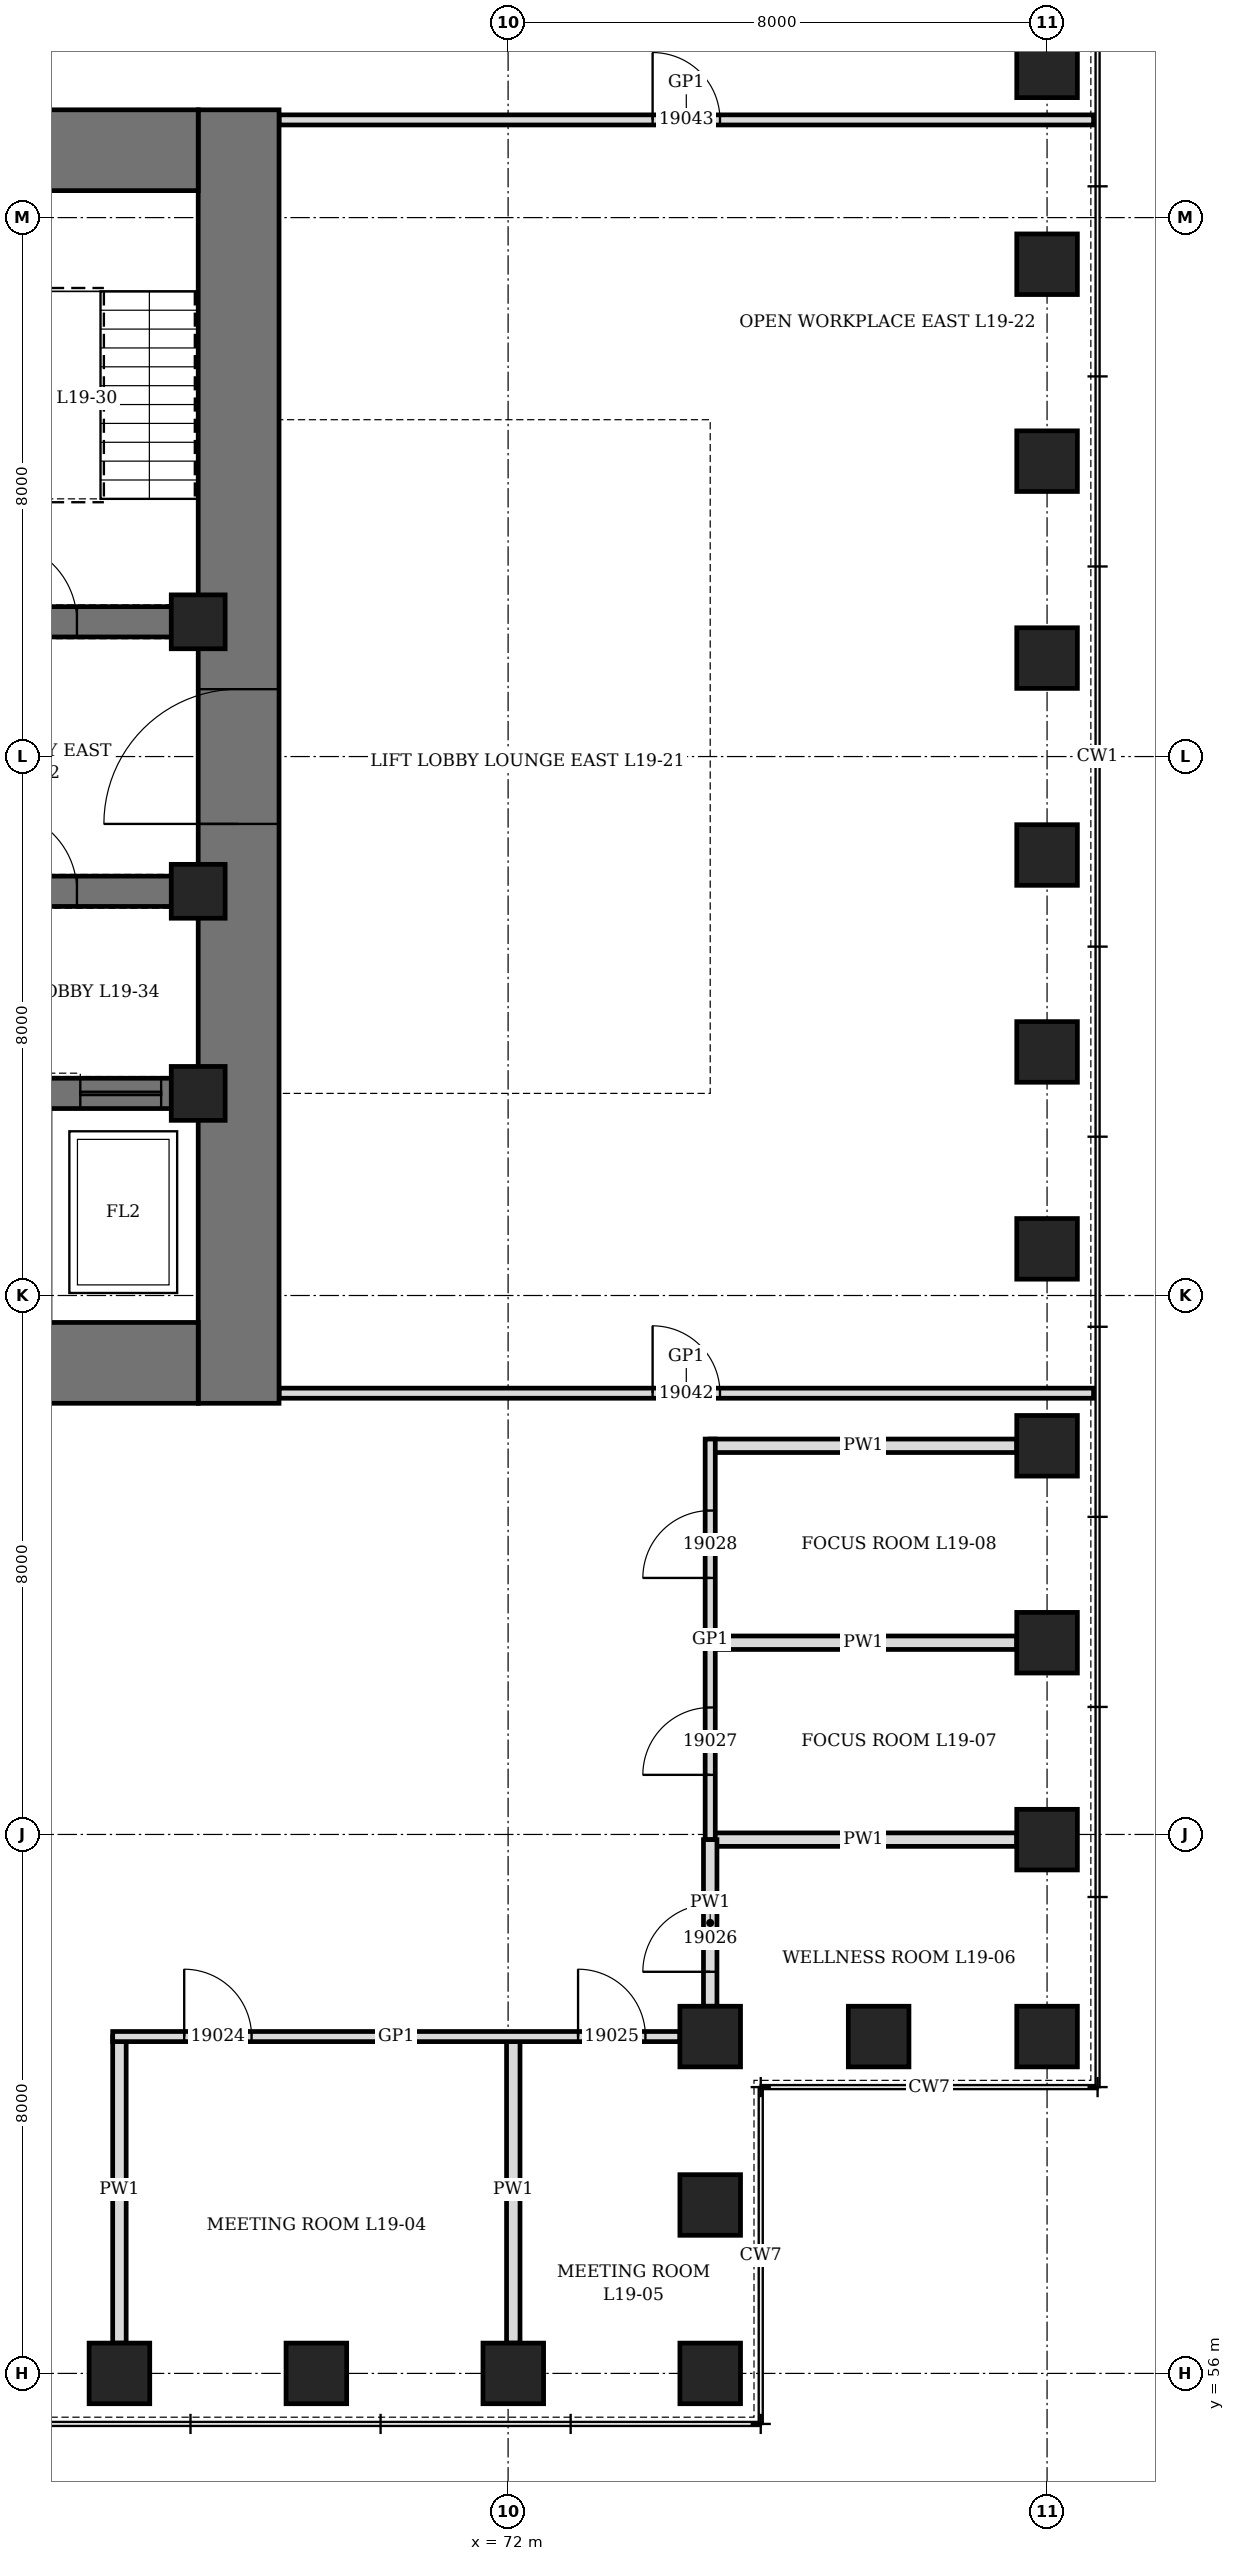
"""IFC4 building model, lengths in metres.
Left out: names, types, materials, properties, quantities, classifications, styles, units other than length and angle.
Written with IfcOpenShell. Run it as: python <this file> out.ifc"""

import sys

from ifc_helpers import new_model, si_unit, direction, frame, frame_2d, origin, origin_2d, place, context, subcontext, project, spatial, rectangle, hollow_rectangle, extrude, element, fill, save


model = new_model("IFC4")
c1 = context("Model", 3, precision=1e-05, world=origin(), true_north=direction((0.0, 1.0)))
c2 = subcontext(c1, "Body", "Model", "MODEL_VIEW")
j1 = project(units=[si_unit("LENGTHUNIT", "METRE"), si_unit("PLANEANGLEUNIT", "RADIAN")], contexts=[c1])
p1 = place(None, origin())
s1 = spatial("IfcSite", under=j1, at=p1, CompositionType="ELEMENT")
p2 = place(p1, origin())
s2 = spatial("IfcBuilding", under=s1, at=p2, CompositionType="ELEMENT")
p3 = place(p2, frame((0.0, 0.0, 89.5)))
s3 = spatial("IfcBuildingStorey", under=s2, at=p3, CompositionType="ELEMENT", Elevation=89.5)
for number, where, z_axis, x_axis in (
    (1, (66.231, 56.0, 0.0), (0.0, 0.0, 1.0), (1.0, 0.0, 0.0)),
    (2, (69.154, 56.0, 0.0), (0.0, 0.0, 1.0), (1.0, 0.0, 0.0)),
    (3, (72.077, 56.0, 0.0), (0.0, 0.0, 1.0), (1.0, 0.0, 0.0)),
    (4, (75.0, 56.0, 0.0), (0.0, 0.0, 1.0), (0.0, 1.0, 0.0)),
    (5, (75.0, 58.5, 0.0), (0.0, 0.0, 1.0), (0.0, 1.0, 0.0)),
    (6, (75.0, 61.0, 0.0), (0.0, 0.0, 1.0), (1.0, 0.0, 0.0)),
    (7, (77.5, 61.0, 0.0), (0.0, 0.0, 1.0), (1.0, 0.0, 0.0)),
    (8, (80.0, 61.0, 0.0), (0.0, 0.0, 1.0), (0.0, 1.0, 0.0)),
    (9, (80.0, 63.923, 0.0), (0.0, 0.0, 1.0), (0.0, 1.0, 0.0)),
    (10, (80.0, 66.846, 0.0), (0.0, 0.0, 1.0), (0.0, 1.0, 0.0)),
    (11, (80.0, 69.769, 0.0), (0.0, 0.0, 1.0), (0.0, 1.0, 0.0)),
    (12, (80.0, 72.692, 0.0), (0.0, 0.0, 1.0), (0.0, 1.0, 0.0)),
    (13, (80.0, 75.615, 0.0), (0.0, 0.0, 1.0), (0.0, 1.0, 0.0)),
    (14, (80.0, 78.539, 0.0), (0.0, 0.0, 1.0), (0.0, 1.0, 0.0)),
    (15, (80.0, 81.461, 0.0), (0.0, 0.0, 1.0), (0.0, 1.0, 0.0)),
    (16, (80.0, 84.385, 0.0), (0.0, 0.0, 1.0), (0.0, 1.0, 0.0)),
    (17, (80.0, 87.308, 0.0), (0.0, 0.0, 1.0), (0.0, 1.0, 0.0)),
    (18, (80.0, 90.231, 0.0), (0.0, 0.0, 1.0), (0.0, 1.0, 0.0)),
):
    element("IfcColumn", number, at=place(p3, frame(where, z_axis=z_axis, x_axis=x_axis)), inside=s3, PredefinedType="COLUMN", context=c2, shape_type="SweptSolid", body=[
        extrude(hollow_rectangle(XDim=0.9, YDim=0.9, WallThickness=0.12, at=origin_2d()), origin(), (0.0, 0.0, 1.0), 4.2),
    ])
p4 = place(p3, frame((68.0, 70.4, 0.0), z_axis=(0.0, 0.0, 1.0), x_axis=(0.0, 1.0, 0.0)))
e19 = element("IfcWall", 19, at=p4, inside=s3, PredefinedType="SHEAR", context=c2, shape_type="SweptSolid", body=[
    extrude(rectangle(XDim=19.2, YDim=1.2, at=frame_2d((9.6, 0.0))), origin(), (0.0, 0.0, 1.0), 4.2),
])
p5 = place(p4, frame((8.6, 0.0, 0.0)))
e20 = element("IfcOpeningElement", 20, at=p5, cuts=e19, PredefinedType="OPENING", context=c2, shape_type="SweptSolid", body=[
    extrude(rectangle(XDim=2.0, YDim=2.4, at=frame_2d((1.0, 1.2))), frame((0.0, 0.61, 0.0), z_axis=(0.0, -1.0, 0.0), x_axis=(1.0, 0.0, 0.0)), (0.0, 0.0, 1.0), 1.22),
])
p6 = place(p3, frame((44.6, 71.0, 0.0), z_axis=(0.0, 0.0, 1.0), x_axis=(1.0, 0.0, 0.0)))
e21 = element("IfcWall", 21, at=p6, inside=s3, PredefinedType="SHEAR", context=c2, shape_type="SweptSolid", body=[
    extrude(rectangle(XDim=22.8, YDim=1.2, at=frame_2d((11.4, 0.0))), origin(), (0.0, 0.0, 1.0), 4.2),
])
p7 = place(p3, frame((44.6, 89.0, 0.0), z_axis=(0.0, 0.0, 1.0), x_axis=(1.0, 0.0, 0.0)))
e22 = element("IfcWall", 22, at=p7, inside=s3, PredefinedType="SHEAR", context=c2, shape_type="SweptSolid", body=[
    extrude(rectangle(XDim=22.8, YDim=1.2, at=frame_2d((11.4, 0.0))), origin(), (0.0, 0.0, 1.0), 4.2),
])
p8 = place(p7, frame((6.325, 0.0, 0.0)))
e23 = element("IfcOpeningElement", 23, at=p8, cuts=e22, PredefinedType="OPENING", context=c2, shape_type="SweptSolid", body=[
    extrude(rectangle(XDim=1.0, YDim=2.1, at=frame_2d((0.5, 1.05))), frame((0.0, 0.61, 0.0), z_axis=(0.0, -1.0, 0.0), x_axis=(1.0, 0.0, 0.0)), (0.0, 0.0, 1.0), 1.22),
])
p9 = place(p7, frame((9.25, 0.0, 0.0)))
e24 = element("IfcOpeningElement", 24, at=p9, cuts=e22, PredefinedType="OPENING", context=c2, shape_type="SweptSolid", body=[
    extrude(rectangle(XDim=0.9, YDim=2.1, at=frame_2d((0.45, 1.05))), frame((0.0, 0.61, 0.0), z_axis=(0.0, -1.0, 0.0), x_axis=(1.0, 0.0, 0.0)), (0.0, 0.0, 1.0), 1.22),
])
p10 = place(p7, frame((13.012, 0.0, 0.0)))
e25 = element("IfcOpeningElement", 25, at=p10, cuts=e22, PredefinedType="OPENING", context=c2, shape_type="SweptSolid", body=[
    extrude(rectangle(XDim=0.9, YDim=2.1, at=frame_2d((0.45, 1.05))), frame((0.0, 0.61, 0.0), z_axis=(0.0, -1.0, 0.0), x_axis=(1.0, 0.0, 0.0)), (0.0, 0.0, 1.0), 1.22),
])
p11 = place(p3, frame((62.225, 75.0, 0.0), z_axis=(0.0, 0.0, 1.0), x_axis=(1.0, 0.0, 0.0)))
e26 = element("IfcWall", 26, at=p11, inside=s3, PredefinedType="SHEAR", context=c2, shape_type="SweptSolid", body=[
    extrude(rectangle(XDim=5.175, YDim=0.45, at=frame_2d((2.587, 0.0))), origin(), (0.0, 0.0, 1.0), 4.2),
])
p12 = place(p11, frame((0.675, 0.0, 0.0)))
e27 = element("IfcOpeningElement", 27, at=p12, cuts=e26, PredefinedType="OPENING", context=c2, shape_type="SweptSolid", body=[
    extrude(rectangle(XDim=1.2, YDim=2.2, at=frame_2d((0.6, 1.1))), frame((0.0, 0.235, 0.0), z_axis=(0.0, -1.0, 0.0), x_axis=(1.0, 0.0, 0.0)), (0.0, 0.0, 1.0), 0.47),
])
p13 = place(p11, frame((3.425, 0.0, 0.0)))
e28 = element("IfcOpeningElement", 28, at=p13, cuts=e26, PredefinedType="OPENING", context=c2, shape_type="SweptSolid", body=[
    extrude(rectangle(XDim=1.2, YDim=2.2, at=frame_2d((0.6, 1.1))), frame((0.0, 0.235, 0.0), z_axis=(0.0, -1.0, 0.0), x_axis=(1.0, 0.0, 0.0)), (0.0, 0.0, 1.0), 0.47),
])
p14 = place(p3, frame((62.225, 78.0, 0.0), z_axis=(0.0, 0.0, 1.0), x_axis=(1.0, 0.0, 0.0)))
e29 = element("IfcWall", 29, at=p14, inside=s3, PredefinedType="SHEAR", context=c2, shape_type="SweptSolid", body=[
    extrude(rectangle(XDim=5.175, YDim=0.45, at=frame_2d((2.587, 0.0))), origin(), (0.0, 0.0, 1.0), 4.2),
])
p15 = place(p14, frame((2.175, 0.0, 0.0)))
e30 = element("IfcOpeningElement", 30, at=p15, cuts=e29, PredefinedType="OPENING", context=c2, shape_type="SweptSolid", body=[
    extrude(rectangle(XDim=1.2, YDim=2.1, at=frame_2d((0.6, 1.05))), frame((0.0, 0.235, 0.0), z_axis=(0.0, -1.0, 0.0), x_axis=(1.0, 0.0, 0.0)), (0.0, 0.0, 1.0), 0.47),
])
p16 = place(p3, frame((62.225, 82.0, 0.0), z_axis=(0.0, 0.0, 1.0), x_axis=(1.0, 0.0, 0.0)))
e31 = element("IfcWall", 31, at=p16, inside=s3, PredefinedType="SHEAR", context=c2, shape_type="SweptSolid", body=[
    extrude(rectangle(XDim=5.175, YDim=0.45, at=frame_2d((2.587, 0.0))), origin(), (0.0, 0.0, 1.0), 4.2),
])
p17 = place(p16, frame((2.175, 0.0, 0.0)))
e32 = element("IfcOpeningElement", 32, at=p17, cuts=e31, PredefinedType="OPENING", context=c2, shape_type="SweptSolid", body=[
    extrude(rectangle(XDim=1.2, YDim=2.1, at=frame_2d((0.6, 1.05))), frame((0.0, 0.235, 0.0), z_axis=(0.0, -1.0, 0.0), x_axis=(1.0, 0.0, 0.0)), (0.0, 0.0, 1.0), 0.47),
])
for number, where, z_axis, x_axis in (
    (33, (67.4, 75.0, 0.0), (0.0, 0.0, 1.0), (1.0, 0.0, 0.0)),
    (34, (67.4, 78.0, 0.0), (0.0, 0.0, 1.0), (1.0, 0.0, 0.0)),
    (35, (67.4, 82.0, 0.0), (0.0, 0.0, 1.0), (1.0, 0.0, 0.0)),
):
    element("IfcColumn", number, at=place(p3, frame(where, z_axis=z_axis, x_axis=x_axis)), inside=s3, PredefinedType="COLUMN", context=c2, shape_type="SweptSolid", body=[
        extrude(hollow_rectangle(XDim=0.8, YDim=0.8, WallThickness=0.1, at=origin_2d()), origin(), (0.0, 0.0, 1.0), 4.2),
    ])
p18 = place(p3, frame((66.231, 56.45, 0.0), z_axis=(0.0, 0.0, 1.0), x_axis=(0.0, 1.0, 0.0)))
e36 = element("IfcWall", 36, at=p18, inside=s3, PredefinedType="PARTITIONING", context=c2, shape_type="SweptSolid", body=[
    extrude(rectangle(XDim=4.55, YDim=0.2, at=frame_2d((2.275, 0.0))), origin(), (0.0, 0.0, 1.0), 3.278),
])
for number, where, z_axis, x_axis in (
    (37, (72.077, 56.45, 0.0), (0.0, 0.0, 1.0), (0.0, 1.0, 0.0)),
    (38, (75.0, 63.923, 0.0), (0.0, 0.0, 1.0), (1.0, 0.0, 0.0)),
    (39, (75.0, 66.846, 0.0), (0.0, 0.0, 1.0), (1.0, 0.0, 0.0)),
    (40, (75.0, 69.769, 0.0), (0.0, 0.0, 1.0), (1.0, 0.0, 0.0)),
):
    element("IfcWall", number, at=place(p3, frame(where, z_axis=z_axis, x_axis=x_axis)), inside=s3, PredefinedType="PARTITIONING", context=c2, shape_type="SweptSolid", body=[
        extrude(rectangle(XDim=4.55, YDim=0.2, at=frame_2d((2.275, 0.0))), origin(), (0.0, 0.0, 1.0), 3.428),
    ])
p19 = place(p3, frame((66.131, 61.0, 0.0), z_axis=(0.0, 0.0, 1.0), x_axis=(1.0, 0.0, 0.0)))
e41 = element("IfcWall", 41, at=p19, inside=s3, PredefinedType="PARTITIONING", context=c2, shape_type="SweptSolid", body=[
    extrude(rectangle(XDim=8.419, YDim=0.15, at=frame_2d((4.209, 0.0))), origin(), (0.0, 0.0, 1.0), 4.04),
])
p20 = place(p19, frame((1.062, 0.0, 0.0)))
e42 = element("IfcOpeningElement", 42, at=p20, cuts=e41, PredefinedType="OPENING", context=c2, shape_type="SweptSolid", body=[
    extrude(rectangle(XDim=1.0, YDim=2.4, at=frame_2d((0.5, 1.2))), frame((0.0, 0.085, 0.0), z_axis=(0.0, -1.0, 0.0), x_axis=(1.0, 0.0, 0.0)), (0.0, 0.0, 1.0), 0.17),
])
p21 = place(p19, frame((6.908, 0.0, 0.0)))
e43 = element("IfcOpeningElement", 43, at=p21, cuts=e41, PredefinedType="OPENING", context=c2, shape_type="SweptSolid", body=[
    extrude(rectangle(XDim=1.0, YDim=2.4, at=frame_2d((0.5, 1.2))), frame((0.0, 0.085, 0.0), z_axis=(0.0, -1.0, 0.0), x_axis=(1.0, 0.0, 0.0)), (0.0, 0.0, 1.0), 0.17),
])
p22 = place(p3, frame((68.6, 70.55, 0.0), z_axis=(0.0, 0.0, 1.0), x_axis=(1.0, 0.0, 0.0)))
e44 = element("IfcWall", 44, at=p22, inside=s3, PredefinedType="PARTITIONING", context=c2, shape_type="SweptSolid", body=[
    extrude(rectangle(XDim=12.09, YDim=0.15, at=frame_2d((6.045, 0.0))), origin(), (0.0, 0.0, 1.0), 4.04),
])
p23 = place(p22, frame((5.545, 0.0, 0.0)))
e45 = element("IfcOpeningElement", 45, at=p23, cuts=e44, PredefinedType="OPENING", context=c2, shape_type="SweptSolid", body=[
    extrude(rectangle(XDim=1.0, YDim=2.4, at=frame_2d((0.5, 1.2))), frame((0.0, 0.085, 0.0), z_axis=(0.0, -1.0, 0.0), x_axis=(1.0, 0.0, 0.0)), (0.0, 0.0, 1.0), 0.17),
])
p24 = place(p3, frame((68.6, 89.45, 0.0), z_axis=(0.0, 0.0, 1.0), x_axis=(1.0, 0.0, 0.0)))
e46 = element("IfcWall", 46, at=p24, inside=s3, PredefinedType="PARTITIONING", context=c2, shape_type="SweptSolid", body=[
    extrude(rectangle(XDim=12.09, YDim=0.15, at=frame_2d((6.045, 0.0))), origin(), (0.0, 0.0, 1.0), 4.04),
])
p25 = place(p24, frame((5.545, 0.0, 0.0)))
e47 = element("IfcOpeningElement", 47, at=p25, cuts=e46, PredefinedType="OPENING", context=c2, shape_type="SweptSolid", body=[
    extrude(rectangle(XDim=1.0, YDim=2.4, at=frame_2d((0.5, 1.2))), frame((0.0, 0.085, 0.0), z_axis=(0.0, -1.0, 0.0), x_axis=(1.0, 0.0, 0.0)), (0.0, 0.0, 1.0), 0.17),
])
p26 = place(p3, frame((75.0, 63.923, 0.0), z_axis=(0.0, 0.0, 1.0), x_axis=(0.0, 1.0, 0.0)))
e48 = element("IfcWall", 48, at=p26, inside=s3, PredefinedType="PARTITIONING", context=c2, shape_type="SweptSolid", body=[
    extrude(rectangle(XDim=5.946, YDim=0.15, at=frame_2d((2.973, 0.0))), origin(), (0.0, 0.0, 1.0), 4.04),
])
p27 = place(p26, frame((0.961, 0.0, 0.0)))
e49 = element("IfcOpeningElement", 49, at=p27, cuts=e48, PredefinedType="OPENING", context=c2, shape_type="SweptSolid", body=[
    extrude(rectangle(XDim=1.0, YDim=2.4, at=frame_2d((0.5, 1.2))), frame((0.0, 0.085, 0.0), z_axis=(0.0, -1.0, 0.0), x_axis=(1.0, 0.0, 0.0)), (0.0, 0.0, 1.0), 0.17),
])
p28 = place(p26, frame((3.885, 0.0, 0.0)))
e50 = element("IfcOpeningElement", 50, at=p28, cuts=e48, PredefinedType="OPENING", context=c2, shape_type="SweptSolid", body=[
    extrude(rectangle(XDim=1.0, YDim=2.4, at=frame_2d((0.5, 1.2))), frame((0.0, 0.085, 0.0), z_axis=(0.0, -1.0, 0.0), x_axis=(1.0, 0.0, 0.0)), (0.0, 0.0, 1.0), 0.17),
])
p29 = place(p3, frame((75.0, 61.45, 0.0), z_axis=(0.0, 0.0, 1.0), x_axis=(0.0, 1.0, 0.0)))
e51 = element("IfcWall", 51, at=p29, inside=s3, PredefinedType="PARTITIONING", context=c2, shape_type="SweptSolid", body=[
    extrude(rectangle(XDim=2.473, YDim=0.2, at=frame_2d((1.237, 0.0))), origin(), (0.0, 0.0, 1.0), 4.04),
])
p30 = place(p29, frame((0.511, 0.0, 0.0)))
e52 = element("IfcOpeningElement", 52, at=p30, cuts=e51, PredefinedType="OPENING", context=c2, shape_type="SweptSolid", body=[
    extrude(rectangle(XDim=1.0, YDim=2.1, at=frame_2d((0.5, 1.05))), frame((0.0, 0.11, 0.0), z_axis=(0.0, -1.0, 0.0), x_axis=(1.0, 0.0, 0.0)), (0.0, 0.0, 1.0), 0.22),
])
p31 = place(p17, origin())
e53 = element("IfcDoor", 53, at=p31, inside=s3, OperationType="SINGLE_SWING_LEFT", PredefinedType="DOOR", context=c2, shape_type="SweptSolid", body=[
    extrude(rectangle(XDim=1.2, YDim=2.1, at=frame_2d((0.6, 1.05))), frame((0.0, 0.225, 0.0), z_axis=(0.0, -1.0, 0.0), x_axis=(1.0, 0.0, 0.0)), (0.0, 0.0, 1.0), 0.449),
])
fill(e32, e53)
p32 = place(p5, origin())
e54 = element("IfcDoor", 54, at=p32, inside=s3, OperationType="DOUBLE_DOOR_SINGLE_SWING", PredefinedType="DOOR", context=c2, shape_type="SweptSolid", body=[
    extrude(rectangle(XDim=2.0, YDim=2.4, at=frame_2d((1.0, 1.2))), frame((0.0, 0.35, 0.0), z_axis=(0.0, -1.0, 0.0), x_axis=(1.0, 0.0, 0.0)), (0.0, 0.0, 1.0), 0.7),
])
fill(e20, e54)
p33 = place(p15, origin())
e55 = element("IfcDoor", 55, at=p33, inside=s3, OperationType="SINGLE_SWING_RIGHT", PredefinedType="DOOR", context=c2, shape_type="SweptSolid", body=[
    extrude(rectangle(XDim=1.2, YDim=2.1, at=frame_2d((0.6, 1.05))), frame((0.0, 0.225, 0.0), z_axis=(0.0, -1.0, 0.0), x_axis=(1.0, 0.0, 0.0)), (0.0, 0.0, 1.0), 0.449),
])
fill(e30, e55)
p34 = place(p13, origin())
e56 = element("IfcDoor", 56, at=p34, inside=s3, OperationType="SLIDING_TO_LEFT", PredefinedType="DOOR", context=c2, shape_type="SweptSolid", body=[
    extrude(rectangle(XDim=1.2, YDim=2.2, at=frame_2d((0.6, 1.1))), frame((0.0, 0.225, 0.0), z_axis=(0.0, -1.0, 0.0), x_axis=(1.0, 0.0, 0.0)), (0.0, 0.0, 1.0), 0.449),
])
fill(e28, e56)
p35 = place(p20, origin())
e57 = element("IfcDoor", 57, at=p35, inside=s3, OperationType="SINGLE_SWING_RIGHT", PredefinedType="DOOR", context=c2, shape_type="SweptSolid", body=[
    extrude(rectangle(XDim=1.0, YDim=2.4, at=frame_2d((0.5, 1.2))), frame((0.0, 0.075, 0.0), z_axis=(0.0, -1.0, 0.0), x_axis=(1.0, 0.0, 0.0)), (0.0, 0.0, 1.0), 0.149),
])
fill(e42, e57)
p36 = place(p21, origin())
e58 = element("IfcDoor", 58, at=p36, inside=s3, OperationType="SINGLE_SWING_RIGHT", PredefinedType="DOOR", context=c2, shape_type="SweptSolid", body=[
    extrude(rectangle(XDim=1.0, YDim=2.4, at=frame_2d((0.5, 1.2))), frame((0.0, 0.075, 0.0), z_axis=(0.0, -1.0, 0.0), x_axis=(1.0, 0.0, 0.0)), (0.0, 0.0, 1.0), 0.149),
])
fill(e43, e58)
p37 = place(p30, origin())
e59 = element("IfcDoor", 59, at=p37, inside=s3, OperationType="SINGLE_SWING_LEFT", PredefinedType="DOOR", context=c2, shape_type="SweptSolid", body=[
    extrude(rectangle(XDim=1.0, YDim=2.1, at=frame_2d((0.5, 1.05))), frame((0.0, 0.1, 0.0), z_axis=(0.0, -1.0, 0.0), x_axis=(1.0, 0.0, 0.0)), (0.0, 0.0, 1.0), 0.199),
])
fill(e52, e59)
p38 = place(p27, origin())
e60 = element("IfcDoor", 60, at=p38, inside=s3, OperationType="SINGLE_SWING_RIGHT", PredefinedType="DOOR", context=c2, shape_type="SweptSolid", body=[
    extrude(rectangle(XDim=1.0, YDim=2.4, at=frame_2d((0.5, 1.2))), frame((0.0, 0.075, 0.0), z_axis=(0.0, -1.0, 0.0), x_axis=(1.0, 0.0, 0.0)), (0.0, 0.0, 1.0), 0.149),
])
fill(e49, e60)
p39 = place(p28, origin())
e61 = element("IfcDoor", 61, at=p39, inside=s3, OperationType="SINGLE_SWING_RIGHT", PredefinedType="DOOR", context=c2, shape_type="SweptSolid", body=[
    extrude(rectangle(XDim=1.0, YDim=2.4, at=frame_2d((0.5, 1.2))), frame((0.0, 0.075, 0.0), z_axis=(0.0, -1.0, 0.0), x_axis=(1.0, 0.0, 0.0)), (0.0, 0.0, 1.0), 0.149),
])
fill(e50, e61)
p40 = place(p23, origin())
e62 = element("IfcDoor", 62, at=p40, inside=s3, OperationType="SINGLE_SWING_RIGHT", PredefinedType="DOOR", context=c2, shape_type="SweptSolid", body=[
    extrude(rectangle(XDim=1.0, YDim=2.4, at=frame_2d((0.5, 1.2))), frame((0.0, 0.075, 0.0), z_axis=(0.0, -1.0, 0.0), x_axis=(1.0, 0.0, 0.0)), (0.0, 0.0, 1.0), 0.149),
])
fill(e45, e62)
p41 = place(p25, origin())
e63 = element("IfcDoor", 63, at=p41, inside=s3, OperationType="SINGLE_SWING_RIGHT", PredefinedType="DOOR", context=c2, shape_type="SweptSolid", body=[
    extrude(rectangle(XDim=1.0, YDim=2.4, at=frame_2d((0.5, 1.2))), frame((0.0, 0.075, 0.0), z_axis=(0.0, -1.0, 0.0), x_axis=(1.0, 0.0, 0.0)), (0.0, 0.0, 1.0), 0.149),
])
fill(e47, e63)
save(model, sys.argv[1])
